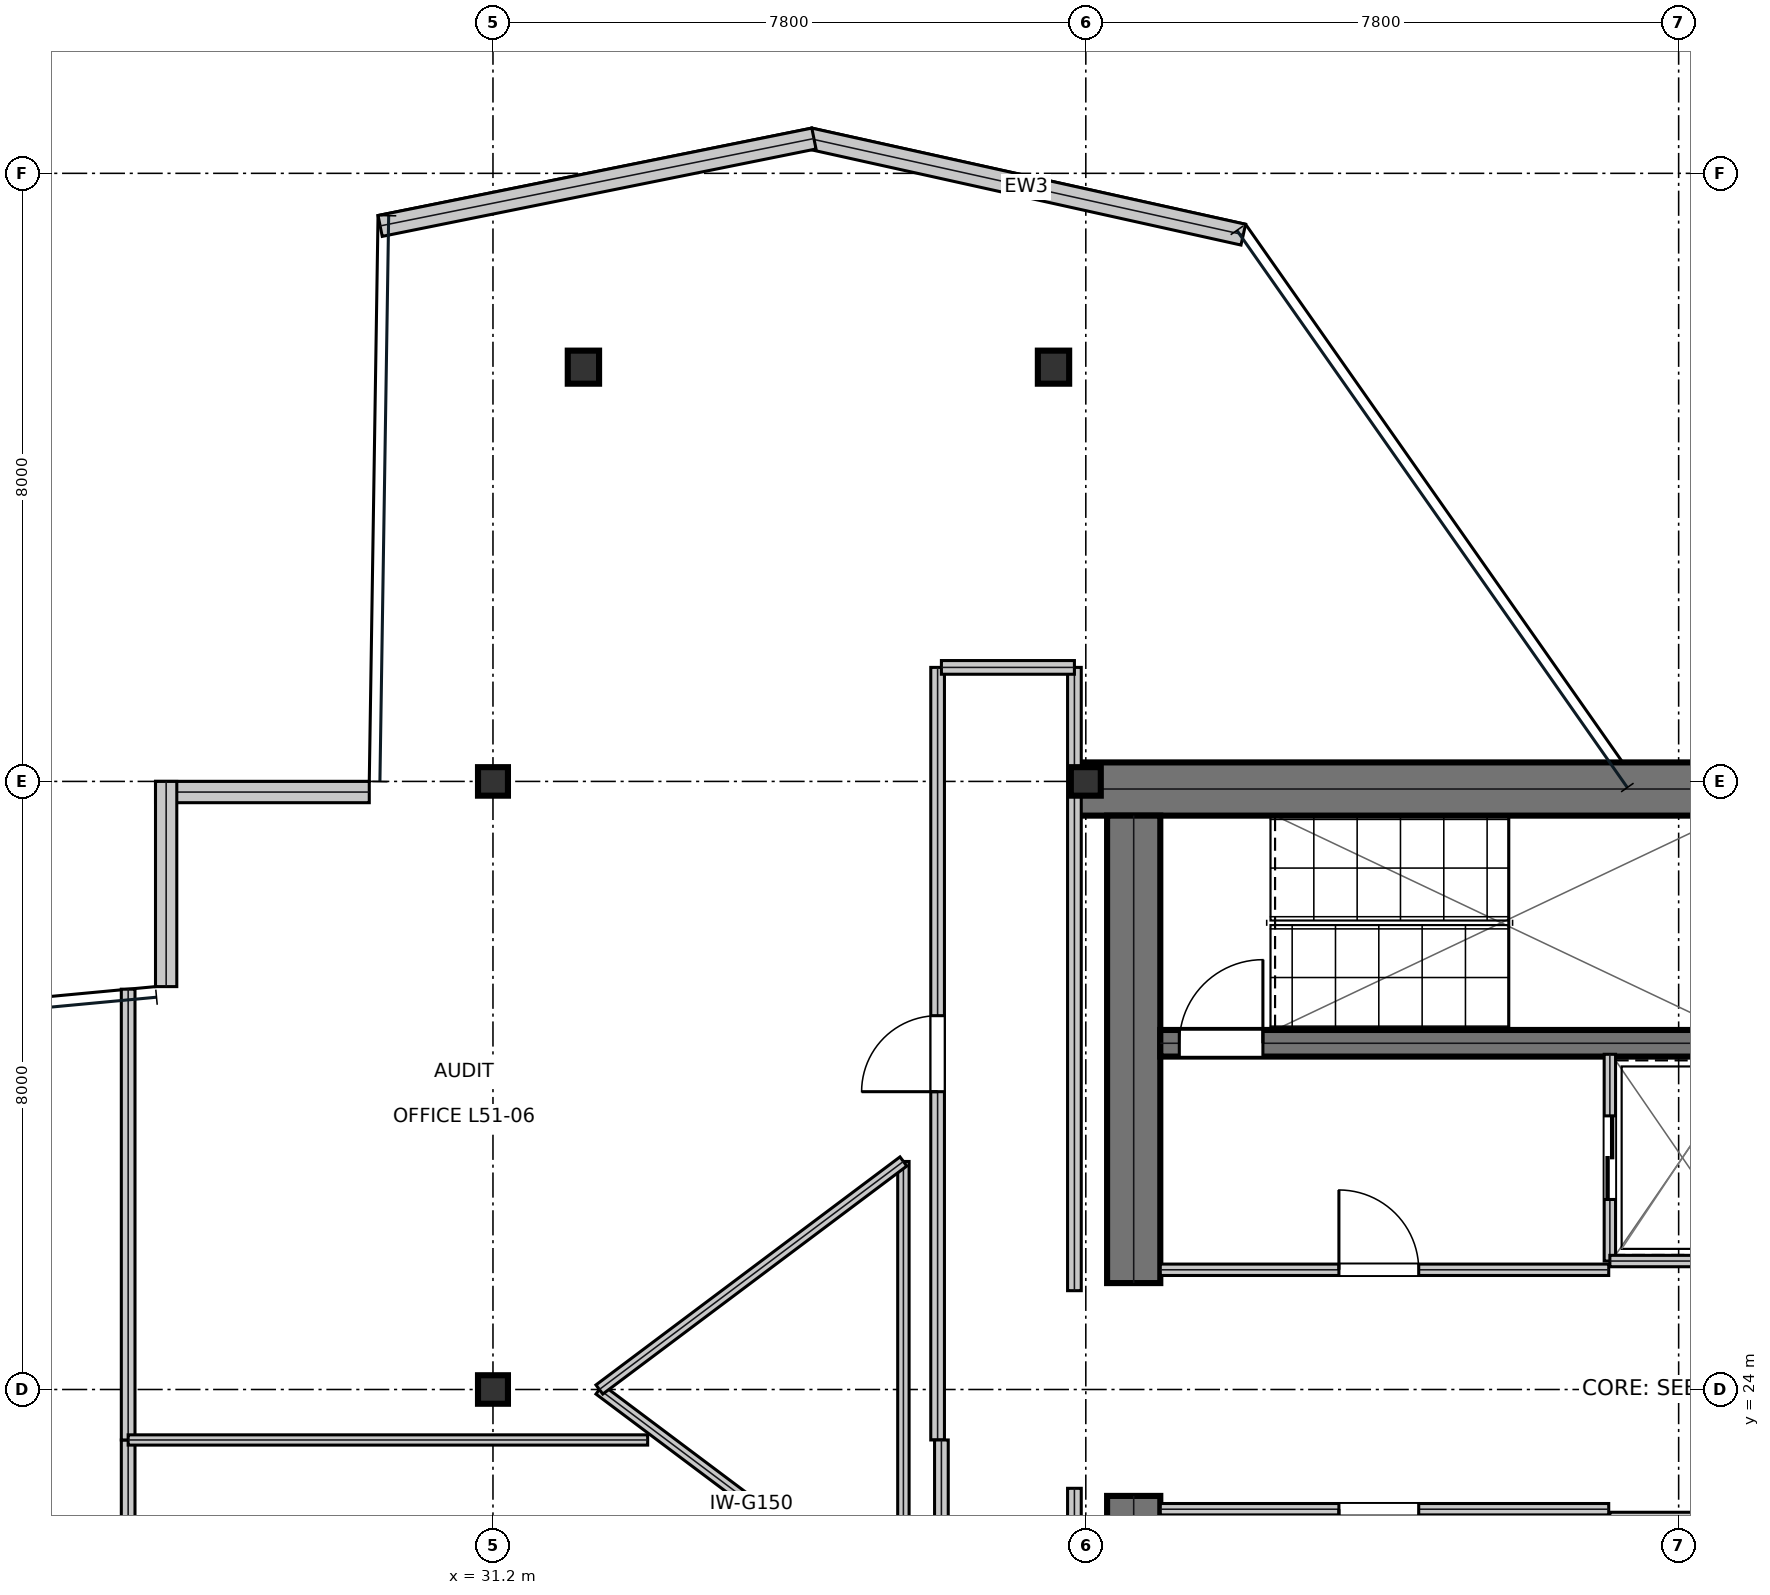
"""IFC4 building model, lengths in metres.
Left out: names, types, materials, properties, quantities, classifications, styles, units other than length and angle.
Written with IfcOpenShell. Run it as: python <this file> out.ifc"""

import sys

from ifc_helpers import new_model, si_unit, direction, frame, frame_2d, origin, origin_2d, place, context, subcontext, project, spatial, rectangle, i_section, extrude, element, fill, save


model = new_model("IFC4")
c1 = context("Model", 3, precision=1e-05, world=origin(), true_north=direction((0.0, 1.0)))
c2 = subcontext(c1, "Body", "Model", "MODEL_VIEW")
j1 = project(units=[si_unit("LENGTHUNIT", "METRE"), si_unit("PLANEANGLEUNIT", "RADIAN")], contexts=[c1])
p1 = place(None, origin())
s1 = spatial("IfcSite", under=j1, at=p1, CompositionType="ELEMENT")
p2 = place(p1, origin())
s2 = spatial("IfcBuilding", under=s1, at=p2, CompositionType="ELEMENT")
p3 = place(p2, frame((0.0, 0.0, 220.2)))
s3 = spatial("IfcBuildingStorey", under=s2, at=p3, CompositionType="ELEMENT", Elevation=220.2)
p4 = place(p3, frame((38.8, 31.9, 0.0), z_axis=(0.0, 0.0, 1.0), x_axis=(1.0, 0.0, 0.0)))
e1 = element("IfcWall", 1, at=p4, inside=s3, PredefinedType="SHEAR", context=c2, shape_type="SweptSolid", body=[
    extrude(rectangle(XDim=16.0, YDim=0.7, at=frame_2d((8.0, 0.0))), origin(), (0.0, 0.0, 1.0), 3.79),
])
for number, where, z_axis, x_axis in (
    (2, (39.63, 16.45, 0.0), (0.0, 0.0, 1.0), (0.0, 1.0, 0.0)),
    (3, (39.63, 25.4, 0.0), (0.0, 0.0, 1.0), (0.0, 1.0, 0.0)),
):
    element("IfcWall", number, at=place(p3, frame(where, z_axis=z_axis, x_axis=x_axis)), inside=s3, PredefinedType="SHEAR", context=c2, shape_type="SweptSolid", body=[
        extrude(rectangle(XDim=6.15, YDim=0.7, at=frame_2d((3.075, 0.0))), origin(), (0.0, 0.0, 1.0), 3.79),
    ])
p5 = place(p3, frame((39.98, 28.555, 0.0), z_axis=(0.0, 0.0, 1.0), x_axis=(1.0, 0.0, 0.0)))
e4 = element("IfcWall", 4, at=p5, inside=s3, PredefinedType="SHEAR", context=c2, shape_type="SweptSolid", body=[
    extrude(rectangle(XDim=7.71, YDim=0.35, at=frame_2d((3.855, 0.0))), origin(), (0.0, 0.0, 1.0), 3.79),
])
p6 = place(p5, frame((0.25, 0.0, 0.0)))
e5 = element("IfcOpeningElement", 5, at=p6, cuts=e4, PredefinedType="OPENING", context=c2, shape_type="SweptSolid", body=[
    extrude(rectangle(XDim=1.1, YDim=2.15, at=frame_2d((0.55, 1.075))), frame((0.0, 0.185, 0.0), z_axis=(0.0, -1.0, 0.0), x_axis=(1.0, 0.0, 0.0)), (0.0, 0.0, 1.0), 0.37),
])
for number, where, z_axis, x_axis in (
    (6, (31.2, 24.0, 0.0), (0.0, 0.0, 1.0), (1.0, 0.0, 0.0)),
    (7, (31.2, 32.0, 0.0), (0.0, 0.0, 1.0), (1.0, 0.0, 0.0)),
    (8, (39.0, 32.0, 0.0), (0.0, 0.0, 1.0), (1.0, 0.0, 0.0)),
):
    element("IfcColumn", number, at=place(p3, frame(where, z_axis=z_axis, x_axis=x_axis)), inside=s3, PredefinedType="COLUMN", context=c2, shape_type="SweptSolid", body=[
        extrude(i_section(OverallWidth=0.394, OverallDepth=0.375, WebThickness=0.017, FlangeThickness=0.028, at=origin_2d()), origin(), (0.0, 0.0, 1.0), 4.044),
    ])
for number, where, z_axis, x_axis in (
    (9, (32.39, 37.45, 0.016), (0.0, 0.0, 1.0), (1.0, 0.0, 0.0)),
    (10, (38.575, 37.45, 0.016), (0.0, 0.0, 1.0), (1.0, 0.0, 0.0)),
):
    element("IfcColumn", number, at=place(p3, frame(where, z_axis=z_axis, x_axis=x_axis)), inside=s3, PredefinedType="COLUMN", context=c2, shape_type="SweptSolid", body=[
        extrude(i_section(OverallWidth=0.412, OverallDepth=0.435, WebThickness=0.036, FlangeThickness=0.058, at=origin_2d()), origin(), (0.0, 0.0, 1.0), 4.018),
    ])
p7 = place(p3, frame((41.072, 39.193, 0.0), z_axis=(0.0, 0.0, 1.0), x_axis=(-0.976309738065, 0.216377668346, 0.0)))
e11 = element("IfcWall", 11, at=p7, inside=s3, PredefinedType="STANDARD", context=c2, shape_type="SweptSolid", body=[
    extrude(rectangle(XDim=5.846, YDim=0.28, at=frame_2d((2.923, 0.0))), origin(), (0.0, 0.0, 1.0), 3.79),
])
p8 = place(p3, frame((35.423, 40.458, 0.0), z_axis=(0.0, 0.0, 1.0), x_axis=(-0.98030065813, -0.197511062146, 0.0)))
e12 = element("IfcWall", 12, at=p8, inside=s3, PredefinedType="STANDARD", context=c2, shape_type="SweptSolid", body=[
    extrude(rectangle(XDim=5.822, YDim=0.28, at=frame_2d((2.911, 0.0))), origin(), (0.0, 0.0, 1.0), 3.79),
])
p9 = place(p3, frame((29.573, 31.86, 0.0), z_axis=(0.0, 0.0, 1.0), x_axis=(-1.0, 0.0, 0.0)))
e13 = element("IfcWall", 13, at=p9, inside=s3, PredefinedType="STANDARD", context=c2, shape_type="SweptSolid", body=[
    extrude(rectangle(XDim=2.812, YDim=0.28, at=frame_2d((1.406, 0.0))), origin(), (0.0, 0.0, 1.0), 3.79),
])
p10 = place(p3, frame((26.9, 32.0, 0.0), z_axis=(0.0, 0.0, 1.0), x_axis=(0.0, -1.0, 0.0)))
e14 = element("IfcWall", 14, at=p10, inside=s3, PredefinedType="STANDARD", context=c2, shape_type="SweptSolid", body=[
    extrude(rectangle(XDim=2.7, YDim=0.28, at=frame_2d((1.35, 0.0))), origin(), (0.0, 0.0, 1.0), 3.319),
])
p11 = place(p3, frame((39.98, 25.575, 0.0), z_axis=(0.0, 0.0, 1.0), x_axis=(1.0, 0.0, 0.0)))
e15 = element("IfcWall", 15, at=p11, inside=s3, PredefinedType="PARTITIONING", context=c2, shape_type="SweptSolid", body=[
    extrude(rectangle(XDim=5.9, YDim=0.15, at=frame_2d((2.95, 0.0))), origin(), (0.0, 0.0, 1.0), 3.79),
])
p12 = place(p11, frame((2.35, 0.0, 0.0)))
e16 = element("IfcOpeningElement", 16, at=p12, cuts=e15, PredefinedType="OPENING", context=c2, shape_type="SweptSolid", body=[
    extrude(rectangle(XDim=1.05, YDim=2.15, at=frame_2d((0.525, 1.075))), frame((0.0, 0.085, 0.0), z_axis=(0.0, -1.0, 0.0), x_axis=(1.0, 0.0, 0.0)), (0.0, 0.0, 1.0), 0.17),
])
p13 = place(p3, frame((39.98, 22.425, 0.0), z_axis=(0.0, 0.0, 1.0), x_axis=(1.0, 0.0, 0.0)))
e17 = element("IfcWall", 17, at=p13, inside=s3, PredefinedType="PARTITIONING", context=c2, shape_type="SweptSolid", body=[
    extrude(rectangle(XDim=5.9, YDim=0.15, at=frame_2d((2.95, 0.0))), origin(), (0.0, 0.0, 1.0), 3.79),
])
p14 = place(p13, frame((2.35, 0.0, 0.0)))
e18 = element("IfcOpeningElement", 18, at=p14, cuts=e17, PredefinedType="OPENING", context=c2, shape_type="SweptSolid", body=[
    extrude(rectangle(XDim=1.05, YDim=2.15, at=frame_2d((0.525, 1.075))), frame((0.0, 0.085, 0.0), z_axis=(0.0, -1.0, 0.0), x_axis=(1.0, 0.0, 0.0)), (0.0, 0.0, 1.0), 0.17),
])
p15 = place(p3, frame((45.895, 25.69, 0.0), z_axis=(0.0, 0.0, 1.0), x_axis=(0.0, 1.0, 0.0)))
e19 = element("IfcWall", 19, at=p15, inside=s3, PredefinedType="PARTITIONING", context=c2, shape_type="SweptSolid", body=[
    extrude(rectangle(XDim=2.72, YDim=0.15, at=frame_2d((1.36, 0.0))), origin(), (0.0, 0.0, 1.0), 3.79),
])
p16 = place(p15, frame((0.81, 0.0, 0.0)))
e20 = element("IfcOpeningElement", 20, at=p16, cuts=e19, PredefinedType="OPENING", context=c2, shape_type="SweptSolid", body=[
    extrude(rectangle(XDim=1.1, YDim=2.15, at=frame_2d((0.55, 1.075))), frame((0.0, 0.085, 0.0), z_axis=(0.0, -1.0, 0.0), x_axis=(1.0, 0.0, 0.0)), (0.0, 0.0, 1.0), 0.17),
])
for number, where, z_axis, x_axis in (
    (21, (45.895, 25.69, 0.0), (0.0, 0.0, 1.0), (1.0, 0.0, 0.0)),
    (22, (45.895, 22.31, 0.0), (0.0, 0.0, 1.0), (1.0, 0.0, 0.0)),
):
    element("IfcWall", number, at=place(p3, frame(where, z_axis=z_axis, x_axis=x_axis)), inside=s3, PredefinedType="PARTITIONING", context=c2, shape_type="SweptSolid", body=[
        extrude(rectangle(XDim=1.915, YDim=0.15, at=frame_2d((0.958, 0.0))), origin(), (0.0, 0.0, 1.0), 3.79),
    ])
p17 = place(p3, frame((37.05, 23.336, 0.0), z_axis=(0.0, 0.0, 1.0), x_axis=(0.0, 1.0, 0.0)))
e23 = element("IfcWall", 23, at=p17, inside=s3, PredefinedType="SOLIDWALL", context=c2, shape_type="SweptSolid", body=[
    extrude(rectangle(XDim=10.164, YDim=0.18, at=frame_2d((5.082, 0.0))), origin(), (0.0, 0.0, 1.0), 3.241),
])
p18 = place(p17, frame((4.582, 0.0, 0.0)))
e24 = element("IfcOpeningElement", 24, at=p18, cuts=e23, PredefinedType="OPENING", context=c2, shape_type="SweptSolid", body=[
    extrude(rectangle(XDim=1.0, YDim=2.15, at=frame_2d((0.5, 1.075))), frame((0.0, 0.1, 0.0), z_axis=(0.0, -1.0, 0.0), x_axis=(1.0, 0.0, 0.0)), (0.0, 0.0, 1.0), 0.2),
])
p19 = place(p3, frame((38.85, 14.707, 0.0), z_axis=(0.0, 0.0, 1.0), x_axis=(0.0, 1.0, 0.0)))
e25 = element("IfcWall", 25, at=p19, inside=s3, PredefinedType="SOLIDWALL", context=c2, shape_type="SweptSolid", body=[
    extrude(rectangle(XDim=7.993, YDim=0.18, at=frame_2d((3.997, 0.0))), origin(), (0.0, 0.0, 1.0), 3.241),
])
p20 = place(p3, frame((26.4, 20.6, 0.0), z_axis=(0.0, 0.0, 1.0), x_axis=(0.0, 1.0, 0.0)))
e26 = element("IfcWall", 26, at=p20, inside=s3, PredefinedType="SOLIDWALL", context=c2, shape_type="SweptSolid", body=[
    extrude(rectangle(XDim=2.736, YDim=0.18, at=frame_2d((1.368, 0.0))), origin(), (0.0, 0.0, 1.0), 3.241),
])
p21 = place(p3, frame((37.1, 20.6, 0.0), z_axis=(0.0, 0.0, 1.0), x_axis=(0.0, 1.0, 0.0)))
e27 = element("IfcWall", 27, at=p21, inside=s3, PredefinedType="SOLIDWALL", context=c2, shape_type="SweptSolid", body=[
    extrude(rectangle(XDim=2.736, YDim=0.18, at=frame_2d((1.368, 0.0))), origin(), (0.0, 0.0, 1.0), 3.79),
])
p22 = place(p3, frame((38.85, 25.3, 0.0), z_axis=(0.0, 0.0, 1.0), x_axis=(0.0, 1.0, 0.0)))
e28 = element("IfcWall", 28, at=p22, inside=s3, PredefinedType="SOLIDWALL", context=c2, shape_type="SweptSolid", body=[
    extrude(rectangle(XDim=8.2, YDim=0.18, at=frame_2d((4.1, 0.0))), origin(), (0.0, 0.0, 1.0), 3.241),
])
p23 = place(p3, frame((26.4, 23.336, 0.0), z_axis=(0.0, 0.0, 1.0), x_axis=(0.0, 1.0, 0.0)))
e29 = element("IfcWall", 29, at=p23, inside=s3, PredefinedType="SOLIDWALL", context=c2, shape_type="SweptSolid", body=[
    extrude(rectangle(XDim=5.931, YDim=0.18, at=frame_2d((2.965, 0.0))), origin(), (0.0, 0.0, 1.0), 3.241),
])
p24 = place(p3, frame((37.1, 33.5, 0.0), z_axis=(0.0, 0.0, 1.0), x_axis=(1.0, 0.0, 0.0)))
e30 = element("IfcWall", 30, at=p24, inside=s3, PredefinedType="SOLIDWALL", context=c2, shape_type="SweptSolid", body=[
    extrude(rectangle(XDim=1.75, YDim=0.18, at=frame_2d((0.875, 0.0))), origin(), (0.0, 0.0, 1.0), 3.241),
])
p25 = place(p3, frame((26.4, 23.336, 0.0), z_axis=(0.0, 0.0, 1.0), x_axis=(1.0, 0.0, 0.0)))
e31 = element("IfcWall", 31, at=p25, inside=s3, PredefinedType="PARTITIONING", context=c2, shape_type="SweptSolid", body=[
    extrude(rectangle(XDim=6.835, YDim=0.135, at=frame_2d((3.418, 0.0))), origin(), (0.0, 0.0, 1.0), 3.241),
])
p26 = place(p3, frame((32.6, 24.0, 0.0), z_axis=(0.0, 0.0, 1.0), x_axis=(0.8, -0.6, 0.0)))
e32 = element("IfcWall", 32, at=p26, inside=s3, PredefinedType="MOVABLE", context=c2, shape_type="SweptSolid", body=[
    extrude(rectangle(XDim=5.0, YDim=0.15, at=frame_2d((2.5, 0.0))), origin(), (0.0, 0.0, 1.0), 3.79),
])
p27 = place(p3, frame((36.6, 21.0, 0.0), z_axis=(0.0, 0.0, 1.0), x_axis=(0.0, 1.0, 0.0)))
e33 = element("IfcWall", 33, at=p27, inside=s3, PredefinedType="MOVABLE", context=c2, shape_type="SweptSolid", body=[
    extrude(rectangle(XDim=6.0, YDim=0.15, at=frame_2d((3.0, 0.0))), origin(), (0.0, 0.0, 1.0), 3.79),
])
p28 = place(p3, frame((36.6, 27.0, 0.0), z_axis=(0.0, 0.0, 1.0), x_axis=(-0.8, -0.6, 0.0)))
e34 = element("IfcWall", 34, at=p28, inside=s3, PredefinedType="MOVABLE", context=c2, shape_type="SweptSolid", body=[
    extrude(rectangle(XDim=5.0, YDim=0.15, at=frame_2d((2.5, 0.0))), origin(), (0.0, 0.0, 1.0), 3.79),
])
p29 = place(p12, origin())
e35 = element("IfcDoor", 35, at=p29, inside=s3, OperationType="SINGLE_SWING_LEFT", PredefinedType="DOOR", context=c2, shape_type="SweptSolid", body=[
    extrude(rectangle(XDim=1.05, YDim=2.15, at=frame_2d((0.525, 1.075))), frame((0.0, 0.025, 0.0), z_axis=(0.0, -1.0, 0.0), x_axis=(1.0, 0.0, 0.0)), (0.0, 0.0, 1.0), 0.05),
])
fill(e16, e35)
p30 = place(p14, frame((1.05, 0.0, 0.0), z_axis=(0.0, 0.0, 1.0), x_axis=(-1.0, 0.0, 0.0)))
e36 = element("IfcDoor", 36, at=p30, inside=s3, OperationType="SINGLE_SWING_RIGHT", PredefinedType="DOOR", context=c2, shape_type="SweptSolid", body=[
    extrude(rectangle(XDim=1.05, YDim=2.15, at=frame_2d((0.525, 1.075))), frame((0.0, 0.025, 0.0), z_axis=(0.0, -1.0, 0.0), x_axis=(1.0, 0.0, 0.0)), (0.0, 0.0, 1.0), 0.05),
])
fill(e18, e36)
p31 = place(p16, frame((1.1, 0.0, 0.0), z_axis=(0.0, 0.0, 1.0), x_axis=(-1.0, 0.0, 0.0)))
e37 = element("IfcDoor", 37, at=p31, inside=s3, OperationType="DOUBLE_DOOR_SLIDING", PredefinedType="DOOR", context=c2, shape_type="SweptSolid", body=[
    extrude(rectangle(XDim=1.1, YDim=2.15, at=frame_2d((0.55, 1.075))), frame((0.0, 0.025, 0.0), z_axis=(0.0, -1.0, 0.0), x_axis=(1.0, 0.0, 0.0)), (0.0, 0.0, 1.0), 0.05),
])
fill(e20, e37)
p32 = place(p18, origin())
e38 = element("IfcDoor", 38, at=p32, inside=s3, OperationType="SINGLE_SWING_LEFT", PredefinedType="DOOR", context=c2, shape_type="SweptSolid", body=[
    extrude(rectangle(XDim=1.0, YDim=2.15, at=frame_2d((0.5, 1.075))), frame((0.0, 0.025, 0.0), z_axis=(0.0, -1.0, 0.0), x_axis=(1.0, 0.0, 0.0)), (0.0, 0.0, 1.0), 0.05),
])
fill(e24, e38)
p33 = place(p6, origin())
e39 = element("IfcDoor", 39, at=p33, inside=s3, OperationType="SINGLE_SWING_RIGHT", PredefinedType="DOOR", context=c2, shape_type="SweptSolid", body=[
    extrude(rectangle(XDim=1.1, YDim=2.15, at=frame_2d((0.55, 1.075))), frame((0.0, 0.025, 0.0), z_axis=(0.0, -1.0, 0.0), x_axis=(1.0, 0.0, 0.0)), (0.0, 0.0, 1.0), 0.05),
])
fill(e5, e39)
save(model, sys.argv[1])
